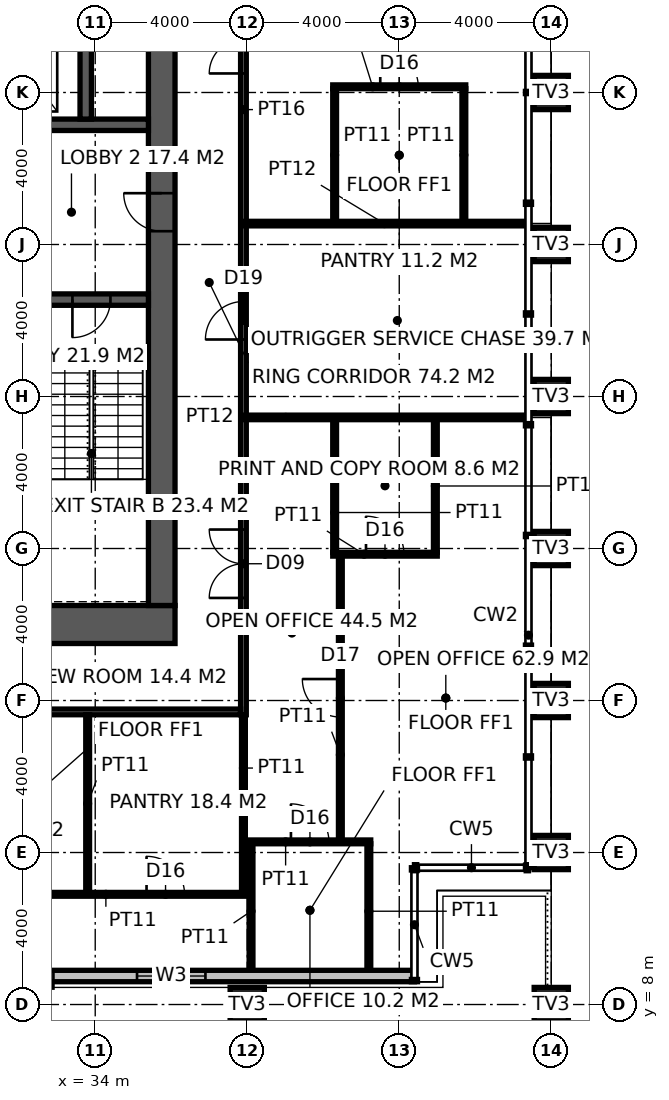
"""IFC4 building model, lengths in metres.
Left out: names, types, materials, properties, quantities, classifications, styles, units other than length and angle.
Written with IfcOpenShell. Run it as: python <this file> out.ifc"""

import sys

from ifc_helpers import new_model, si_unit, direction, frame, frame_2d, origin, origin_2d, place, context, subcontext, project, spatial, rectangle, hollow_rectangle, extrude, element, fill, save


model = new_model("IFC4")
c1 = context("Model", 3, precision=1e-05, world=origin(), true_north=direction((0.0, 1.0)))
c2 = subcontext(c1, "Body", "Model", "MODEL_VIEW")
j1 = project(units=[si_unit("LENGTHUNIT", "METRE"), si_unit("PLANEANGLEUNIT", "RADIAN")], contexts=[c1])
p1 = place(None, origin())
s1 = spatial("IfcSite", under=j1, at=p1, CompositionType="ELEMENT")
p2 = place(p1, origin())
s2 = spatial("IfcBuilding", under=s1, at=p2, CompositionType="ELEMENT")
p3 = place(p2, frame((0.0, 0.0, 171.8)))
s3 = spatial("IfcBuildingStorey", under=s2, at=p3, CompositionType="ELEMENT", Elevation=171.8)
for number, where, z_axis, x_axis in (
    (1, (38.0, 8.0, 0.0), (0.0, 0.0, 1.0), (1.0, 0.0, 0.0)),
    (2, (46.0, 8.0, 0.0), (0.0, 0.0, 1.0), (1.0, 0.0, 0.0)),
    (3, (46.0, 12.0, 0.0), (0.0, 0.0, 1.0), (1.0, 0.0, 0.0)),
    (4, (46.0, 16.0, 0.0), (0.0, 0.0, 1.0), (1.0, 0.0, 0.0)),
    (5, (46.0, 20.0, 0.0), (0.0, 0.0, 1.0), (1.0, 0.0, 0.0)),
    (6, (46.0, 24.0, 0.0), (0.0, 0.0, 1.0), (1.0, 0.0, 0.0)),
    (7, (46.0, 28.0, 0.0), (0.0, 0.0, 1.0), (1.0, 0.0, 0.0)),
    (8, (46.0, 32.0, 0.0), (0.0, 0.0, 1.0), (1.0, 0.0, 0.0)),
):
    element("IfcColumn", number, at=place(p3, frame(where, z_axis=z_axis, x_axis=x_axis)), inside=s3, PredefinedType="USERDEFINED", context=c2, shape_type="SweptSolid", body=[
        extrude(hollow_rectangle(XDim=0.9, YDim=0.9, WallThickness=0.08, at=origin_2d()), origin(), (0.0, 0.0, 1.0), 4.0),
    ])
p4 = place(p3, frame((18.5, 18.0, -0.15), z_axis=(0.0, 0.0, 1.0), x_axis=(1.0, 0.0, 0.0)))
e9 = element("IfcWall", 9, at=p4, inside=s3, PredefinedType="SHEAR", context=c2, shape_type="SweptSolid", body=[
    extrude(rectangle(XDim=17.6, YDim=1.0, at=frame_2d((8.8, 0.0))), origin(), (0.0, 0.0, 1.0), 4.0),
])
p5 = place(p4, frame((3.45, 0.0, 0.15)))
e10 = element("IfcOpeningElement", 10, at=p5, cuts=e9, PredefinedType="OPENING", context=c2, shape_type="SweptSolid", body=[
    extrude(rectangle(XDim=1.5, YDim=2.4, at=frame_2d((0.75, 1.2))), frame((0.0, 0.51, 0.0), z_axis=(0.0, -1.0, 0.0), x_axis=(1.0, 0.0, 0.0)), (0.0, 0.0, 1.0), 1.02),
])
p6 = place(p3, frame((35.75, 18.5, -0.15), z_axis=(0.0, 0.0, 1.0), x_axis=(0.0, 1.0, 0.0)))
e11 = element("IfcWall", 11, at=p6, inside=s3, PredefinedType="SHEAR", context=c2, shape_type="SweptSolid", body=[
    extrude(rectangle(XDim=17.0, YDim=0.7, at=frame_2d((8.5, 0.0))), origin(), (0.0, 0.0, 1.0), 4.0),
])
p7 = place(p6, frame((9.85, 0.0, 0.15)))
e12 = element("IfcOpeningElement", 12, at=p7, cuts=e11, PredefinedType="OPENING", context=c2, shape_type="SweptSolid", body=[
    extrude(rectangle(XDim=1.0, YDim=2.2, at=frame_2d((0.5, 1.1))), frame((0.0, 0.36, 0.0), z_axis=(0.0, -1.0, 0.0), x_axis=(1.0, 0.0, 0.0)), (0.0, 0.0, 1.0), 0.72),
])
p8 = place(p3, frame((24.15, 26.55, -0.15), z_axis=(0.0, 0.0, 1.0), x_axis=(1.0, 0.0, 0.0)))
e13 = element("IfcWall", 13, at=p8, inside=s3, PredefinedType="SHEAR", context=c2, shape_type="SweptSolid", body=[
    extrude(rectangle(XDim=11.25, YDim=0.3, at=frame_2d((5.625, 0.0))), origin(), (0.0, 0.0, 1.0), 4.0),
])
p9 = place(p8, frame((9.25, 0.0, 0.15)))
e14 = element("IfcOpeningElement", 14, at=p9, cuts=e13, PredefinedType="OPENING", context=c2, shape_type="SweptSolid", body=[
    extrude(rectangle(XDim=1.0, YDim=2.2, at=frame_2d((0.5, 1.1))), frame((0.0, 0.16, 0.0), z_axis=(0.0, -1.0, 0.0), x_axis=(1.0, 0.0, 0.0)), (0.0, 0.0, 1.0), 0.32),
])
p10 = place(p8, frame((4.9, 0.0, 0.15)))
e15 = element("IfcOpeningElement", 15, at=p10, cuts=e13, PredefinedType="OPENING", context=c2, shape_type="SweptSolid", body=[
    extrude(rectangle(XDim=1.5, YDim=2.4, at=frame_2d((0.75, 1.2))), frame((0.0, 0.16, 0.0), z_axis=(0.0, -1.0, 0.0), x_axis=(1.0, 0.0, 0.0)), (0.0, 0.0, 1.0), 0.32),
])
p11 = place(p3, frame((24.15, 31.15, -0.15), z_axis=(0.0, 0.0, 1.0), x_axis=(1.0, 0.0, 0.0)))
e16 = element("IfcWall", 16, at=p11, inside=s3, PredefinedType="SHEAR", context=c2, shape_type="SweptSolid", body=[
    extrude(rectangle(XDim=11.25, YDim=0.3, at=frame_2d((5.625, 0.0))), origin(), (0.0, 0.0, 1.0), 4.0),
])
p12 = place(p11, frame((7.25, 0.0, 0.15)))
e17 = element("IfcOpeningElement", 17, at=p12, cuts=e16, PredefinedType="OPENING", context=c2, shape_type="SweptSolid", body=[
    extrude(rectangle(XDim=1.4, YDim=2.4, at=frame_2d((0.7, 1.2))), frame((0.0, 0.16, 0.0), z_axis=(0.0, -1.0, 0.0), x_axis=(1.0, 0.0, 0.0)), (0.0, 0.0, 1.0), 0.32),
])
p13 = place(p3, frame((33.75, 31.3, -0.15), z_axis=(0.0, 0.0, 1.0), x_axis=(0.0, 1.0, 0.0)))
e18 = element("IfcWall", 18, at=p13, inside=s3, PredefinedType="SHEAR", context=c2, shape_type="SweptSolid", body=[
    extrude(rectangle(XDim=4.2, YDim=0.3, at=frame_2d((2.1, 0.0))), origin(), (0.0, 0.0, 1.0), 4.0),
])
p14 = place(p3, frame((37.9, 15.625, 0.0), z_axis=(0.0, 0.0, 1.0), x_axis=(0.0, 1.0, 0.0)))
e19 = element("IfcWall", 19, at=p14, inside=s3, PredefinedType="PARTITIONING", context=c2, shape_type="SweptSolid", body=[
    extrude(rectangle(XDim=22.75, YDim=0.15, at=frame_2d((11.375, 0.0))), origin(), (0.0, 0.0, 1.0), 2.65),
])
p15 = place(p14, frame((3.074, 0.0, 0.0)))
e20 = element("IfcOpeningElement", 20, at=p15, cuts=e19, PredefinedType="OPENING", context=c2, shape_type="SweptSolid", body=[
    extrude(rectangle(XDim=1.8, YDim=2.4, at=frame_2d((0.9, 1.2))), frame((0.0, 0.085, 0.0), z_axis=(0.0, -1.0, 0.0), x_axis=(1.0, 0.0, 0.0)), (0.0, 0.0, 1.0), 0.17),
])
p16 = place(p14, frame((16.876, 0.0, 0.0)))
e21 = element("IfcOpeningElement", 21, at=p16, cuts=e19, PredefinedType="OPENING", context=c2, shape_type="SweptSolid", body=[
    extrude(rectangle(XDim=1.8, YDim=2.4, at=frame_2d((0.9, 1.2))), frame((0.0, 0.085, 0.0), z_axis=(0.0, -1.0, 0.0), x_axis=(1.0, 0.0, 0.0)), (0.0, 0.0, 1.0), 0.17),
])
p17 = place(p14, frame((9.875, 0.0, 0.0)))
e22 = element("IfcOpeningElement", 22, at=p17, cuts=e19, PredefinedType="OPENING", context=c2, shape_type="SweptSolid", body=[
    extrude(rectangle(XDim=1.0, YDim=2.2, at=frame_2d((0.5, 1.1))), frame((0.0, 0.085, 0.0), z_axis=(0.0, -1.0, 0.0), x_axis=(1.0, 0.0, 0.0)), (0.0, 0.0, 1.0), 0.17),
])
p18 = place(p3, frame((15.775, 15.7, 0.0), z_axis=(0.0, 0.0, 1.0), x_axis=(1.0, 0.0, 0.0)))
e23 = element("IfcWall", 23, at=p18, inside=s3, PredefinedType="PARTITIONING", context=c2, shape_type="SweptSolid", body=[
    extrude(rectangle(XDim=22.05, YDim=0.15, at=frame_2d((11.025, 0.0))), origin(), (0.0, 0.0, 1.0), 3.85),
])
p19 = place(p18, frame((11.725, 0.0, 0.0)))
e24 = element("IfcOpeningElement", 24, at=p19, cuts=e23, PredefinedType="OPENING", context=c2, shape_type="SweptSolid", body=[
    extrude(rectangle(XDim=1.0, YDim=2.2, at=frame_2d((0.5, 1.1))), frame((0.0, 0.085, 0.0), z_axis=(0.0, -1.0, 0.0), x_axis=(1.0, 0.0, 0.0)), (0.0, 0.0, 1.0), 0.17),
])
for number, where, z_axis, x_axis in (
    (25, (37.9, 23.45, 0.0), (0.0, 0.0, 1.0), (1.0, 0.0, 0.0)),
    (26, (37.9, 28.55, 0.0), (0.0, 0.0, 1.0), (1.0, 0.0, 0.0)),
):
    element("IfcWall", number, at=place(p3, frame(where, z_axis=z_axis, x_axis=x_axis)), inside=s3, PredefinedType="PARTITIONING", context=c2, shape_type="SweptSolid", body=[
        extrude(rectangle(XDim=7.42, YDim=0.12, at=frame_2d((3.71, 0.0))), origin(), (0.0, 0.0, 1.0), 2.65),
    ])
p20 = place(p3, frame((30.611, 10.9, 0.0), z_axis=(0.0, 0.0, 1.0), x_axis=(1.0, 0.0, 0.0)))
e27 = element("IfcWall", 27, at=p20, inside=s3, PredefinedType="PARTITIONING", context=c2, shape_type="SweptSolid", body=[
    extrude(rectangle(XDim=7.339, YDim=0.1, at=frame_2d((3.669, 0.0))), origin(), (0.0, 0.0, 1.0), 3.85),
])
p21 = place(p20, frame((1.065, 0.0, 0.0)))
e28 = element("IfcOpeningElement", 28, at=p21, cuts=e27, PredefinedType="OPENING", context=c2, shape_type="SweptSolid", body=[
    extrude(rectangle(XDim=1.0, YDim=2.2, at=frame_2d((0.5, 1.1))), frame((0.0, 0.06, 0.0), z_axis=(0.0, -1.0, 0.0), x_axis=(1.0, 0.0, 0.0)), (0.0, 0.0, 1.0), 0.12),
])
p22 = place(p20, frame((4.74, 0.0, 0.0)))
e29 = element("IfcOpeningElement", 29, at=p22, cuts=e27, PredefinedType="OPENING", context=c2, shape_type="SweptSolid", body=[
    extrude(rectangle(XDim=1.0, YDim=2.2, at=frame_2d((0.5, 1.1))), frame((0.0, 0.06, 0.0), z_axis=(0.0, -1.0, 0.0), x_axis=(1.0, 0.0, 0.0)), (0.0, 0.0, 1.0), 0.12),
])
p23 = place(p3, frame((38.05, 12.28, 0.0), z_axis=(0.0, 0.0, 1.0), x_axis=(1.0, 0.0, 0.0)))
e30 = element("IfcWall", 30, at=p23, inside=s3, PredefinedType="PARTITIONING", context=c2, shape_type="SweptSolid", body=[
    extrude(rectangle(XDim=3.2, YDim=0.1, at=frame_2d((1.6, 0.0))), origin(), (0.0, 0.0, 1.0), 3.85),
])
p24 = place(p23, frame((1.1, 0.0, 0.0)))
e31 = element("IfcOpeningElement", 31, at=p24, cuts=e30, PredefinedType="OPENING", context=c2, shape_type="SweptSolid", body=[
    extrude(rectangle(XDim=1.0, YDim=2.2, at=frame_2d((0.5, 1.1))), frame((0.0, 0.06, 0.0), z_axis=(0.0, -1.0, 0.0), x_axis=(1.0, 0.0, 0.0)), (0.0, 0.0, 1.0), 0.12),
])
p25 = place(p3, frame((40.25, 19.85, 0.0), z_axis=(0.0, 0.0, 1.0), x_axis=(1.0, 0.0, 0.0)))
e32 = element("IfcWall", 32, at=p25, inside=s3, PredefinedType="PARTITIONING", context=c2, shape_type="SweptSolid", body=[
    extrude(rectangle(XDim=2.75, YDim=0.1, at=frame_2d((1.375, 0.0))), origin(), (0.0, 0.0, 1.0), 2.85),
])
p26 = place(p25, frame((0.875, 0.0, 0.0)))
e33 = element("IfcOpeningElement", 33, at=p26, cuts=e32, PredefinedType="OPENING", context=c2, shape_type="SweptSolid", body=[
    extrude(rectangle(XDim=1.0, YDim=2.2, at=frame_2d((0.5, 1.1))), frame((0.0, 0.06, 0.0), z_axis=(0.0, -1.0, 0.0), x_axis=(1.0, 0.0, 0.0)), (0.0, 0.0, 1.0), 0.12),
])
p27 = place(p3, frame((40.25, 32.15, 0.0), z_axis=(0.0, 0.0, 1.0), x_axis=(1.0, 0.0, 0.0)))
e34 = element("IfcWall", 34, at=p27, inside=s3, PredefinedType="PARTITIONING", context=c2, shape_type="SweptSolid", body=[
    extrude(rectangle(XDim=3.5, YDim=0.1, at=frame_2d((1.75, 0.0))), origin(), (0.0, 0.0, 1.0), 2.95),
])
p28 = place(p27, frame((1.25, 0.0, 0.0)))
e35 = element("IfcOpeningElement", 35, at=p28, cuts=e34, PredefinedType="OPENING", context=c2, shape_type="SweptSolid", body=[
    extrude(rectangle(XDim=1.0, YDim=2.2, at=frame_2d((0.5, 1.1))), frame((0.0, 0.06, 0.0), z_axis=(0.0, -1.0, 0.0), x_axis=(1.0, 0.0, 0.0)), (0.0, 0.0, 1.0), 0.12),
])
for number, where, z_axis, x_axis in (
    (36, (33.801, 10.95, 0.0), (0.0, 0.0, 1.0), (0.0, 1.0, 0.0)),
    (37, (37.9, 10.95, 0.0), (0.0, 0.0, 1.0), (0.0, 1.0, 0.0)),
):
    element("IfcWall", number, at=place(p3, frame(where, z_axis=z_axis, x_axis=x_axis)), inside=s3, PredefinedType="PARTITIONING", context=c2, shape_type="SweptSolid", body=[
        extrude(rectangle(XDim=4.675, YDim=0.1, at=frame_2d((2.337, 0.0))), origin(), (0.0, 0.0, 1.0), 2.65),
    ])
p29 = place(p3, frame((38.1, 8.68, 0.0), z_axis=(0.0, 0.0, 1.0), x_axis=(0.0, 1.0, 0.0)))
e38 = element("IfcWall", 38, at=p29, inside=s3, PredefinedType="PARTITIONING", context=c2, shape_type="SweptSolid", body=[
    extrude(rectangle(XDim=3.55, YDim=0.1, at=frame_2d((1.775, 0.0))), origin(), (0.0, 0.0, 1.0), 2.65),
])
for number, where, z_axis, x_axis in (
    (39, (40.3, 19.9, 0.0), (0.0, 0.0, 1.0), (0.0, 1.0, 0.0)),
    (40, (40.3, 28.61, 0.0), (0.0, 0.0, 1.0), (0.0, 1.0, 0.0)),
):
    element("IfcWall", number, at=place(p3, frame(where, z_axis=z_axis, x_axis=x_axis)), inside=s3, PredefinedType="PARTITIONING", context=c2, shape_type="SweptSolid", body=[
        extrude(rectangle(XDim=3.49, YDim=0.1, at=frame_2d((1.745, 0.0))), origin(), (0.0, 0.0, 1.0), 3.85),
    ])
p30 = place(p3, frame((41.2, 8.68, 0.0), z_axis=(0.0, 0.0, 1.0), x_axis=(0.0, 1.0, 0.0)))
e41 = element("IfcWall", 41, at=p30, inside=s3, PredefinedType="PARTITIONING", context=c2, shape_type="SweptSolid", body=[
    extrude(rectangle(XDim=3.55, YDim=0.1, at=frame_2d((1.775, 0.0))), origin(), (0.0, 0.0, 1.0), 3.85),
])
for number, where, z_axis, x_axis in (
    (42, (42.95, 19.9, 0.0), (0.0, 0.0, 1.0), (0.0, 1.0, 0.0)),
    (43, (43.7, 28.61, 0.0), (0.0, 0.0, 1.0), (0.0, 1.0, 0.0)),
):
    element("IfcWall", number, at=place(p3, frame(where, z_axis=z_axis, x_axis=x_axis)), inside=s3, PredefinedType="PARTITIONING", context=c2, shape_type="SweptSolid", body=[
        extrude(rectangle(XDim=3.49, YDim=0.1, at=frame_2d((1.745, 0.0))), origin(), (0.0, 0.0, 1.0), 3.85),
    ])
p31 = place(p3, frame((40.45, 12.33, 0.0), z_axis=(0.0, 0.0, 1.0), x_axis=(0.0, 1.0, 0.0)))
e44 = element("IfcWall", 44, at=p31, inside=s3, PredefinedType="PARTITIONING", context=c2, shape_type="SweptSolid", body=[
    extrude(rectangle(XDim=7.47, YDim=0.1, at=frame_2d((3.735, 0.0))), origin(), (0.0, 0.0, 1.0), 3.85),
])
p32 = place(p31, frame((3.235, 0.0, 0.0)))
e45 = element("IfcOpeningElement", 45, at=p32, cuts=e44, PredefinedType="OPENING", context=c2, shape_type="SweptSolid", body=[
    extrude(rectangle(XDim=1.0, YDim=2.2, at=frame_2d((0.5, 1.1))), frame((0.0, 0.06, 0.0), z_axis=(0.0, -1.0, 0.0), x_axis=(1.0, 0.0, 0.0)), (0.0, 0.0, 1.0), 0.12),
])
p33 = place(p3, frame((9.6, 8.75, 0.0), z_axis=(0.0, 0.0, 1.0), x_axis=(1.0, 0.0, 0.0)))
e46 = element("IfcWall", 46, at=p33, inside=s3, PredefinedType="ELEMENTEDWALL", context=c2, shape_type="SweptSolid", body=[
    extrude(rectangle(XDim=32.8, YDim=0.3, at=frame_2d((16.4, 0.0))), origin(), (0.0, 0.0, 1.0), 3.85),
])
p34 = place(p33, frame((5.5, 0.0, 0.8)))
e47 = element("IfcOpeningElement", 47, at=p34, cuts=e46, PredefinedType="OPENING", context=c2, shape_type="SweptSolid", body=[
    extrude(rectangle(XDim=1.8, YDim=2.4, at=frame_2d((0.9, 1.2))), frame((0.0, 0.16, 0.0), z_axis=(0.0, -1.0, 0.0), x_axis=(1.0, 0.0, 0.0)), (0.0, 0.0, 1.0), 0.32),
])
p35 = place(p33, frame((9.5, 0.0, 0.0)))
e48 = element("IfcOpeningElement", 48, at=p35, cuts=e46, PredefinedType="OPENING", context=c2, shape_type="SweptSolid", body=[
    extrude(rectangle(XDim=1.8, YDim=2.4, at=frame_2d((0.9, 1.2))), frame((0.0, 0.16, 0.0), z_axis=(0.0, -1.0, 0.0), x_axis=(1.0, 0.0, 0.0)), (0.0, 0.0, 1.0), 0.32),
])
p36 = place(p33, frame((13.5, 0.0, 0.8)))
e49 = element("IfcOpeningElement", 49, at=p36, cuts=e46, PredefinedType="OPENING", context=c2, shape_type="SweptSolid", body=[
    extrude(rectangle(XDim=1.8, YDim=2.4, at=frame_2d((0.9, 1.2))), frame((0.0, 0.16, 0.0), z_axis=(0.0, -1.0, 0.0), x_axis=(1.0, 0.0, 0.0)), (0.0, 0.0, 1.0), 0.32),
])
p37 = place(p33, frame((17.2, 0.0, 0.8)))
e50 = element("IfcOpeningElement", 50, at=p37, cuts=e46, PredefinedType="OPENING", context=c2, shape_type="SweptSolid", body=[
    extrude(rectangle(XDim=1.0, YDim=2.4, at=frame_2d((0.5, 1.2))), frame((0.0, 0.16, 0.0), z_axis=(0.0, -1.0, 0.0), x_axis=(1.0, 0.0, 0.0)), (0.0, 0.0, 1.0), 0.32),
])
p38 = place(p33, frame((18.6, 0.0, 0.8)))
e51 = element("IfcOpeningElement", 51, at=p38, cuts=e46, PredefinedType="OPENING", context=c2, shape_type="SweptSolid", body=[
    extrude(rectangle(XDim=1.0, YDim=2.4, at=frame_2d((0.5, 1.2))), frame((0.0, 0.16, 0.0), z_axis=(0.0, -1.0, 0.0), x_axis=(1.0, 0.0, 0.0)), (0.0, 0.0, 1.0), 0.32),
])
p39 = place(p33, frame((21.5, 0.0, 0.0)))
e52 = element("IfcOpeningElement", 52, at=p39, cuts=e46, PredefinedType="OPENING", context=c2, shape_type="SweptSolid", body=[
    extrude(rectangle(XDim=1.8, YDim=2.4, at=frame_2d((0.9, 1.2))), frame((0.0, 0.16, 0.0), z_axis=(0.0, -1.0, 0.0), x_axis=(1.0, 0.0, 0.0)), (0.0, 0.0, 1.0), 0.32),
])
p40 = place(p33, frame((25.5, 0.0, 0.8)))
e53 = element("IfcOpeningElement", 53, at=p40, cuts=e46, PredefinedType="OPENING", context=c2, shape_type="SweptSolid", body=[
    extrude(rectangle(XDim=1.8, YDim=2.4, at=frame_2d((0.9, 1.2))), frame((0.0, 0.16, 0.0), z_axis=(0.0, -1.0, 0.0), x_axis=(1.0, 0.0, 0.0)), (0.0, 0.0, 1.0), 0.32),
])
p41 = place(p9, frame((1.0, 0.0, 0.0), z_axis=(0.0, 0.0, 1.0), x_axis=(-1.0, 0.0, 0.0)))
e54 = element("IfcDoor", 54, at=p41, inside=s3, OperationType="SINGLE_SWING_RIGHT", PredefinedType="DOOR", context=c2, shape_type="SweptSolid", body=[
    extrude(rectangle(XDim=1.0, YDim=2.2, at=frame_2d((0.5, 1.1))), frame((0.0, 0.025, 0.0), z_axis=(0.0, -1.0, 0.0), x_axis=(1.0, 0.0, 0.0)), (0.0, 0.0, 1.0), 0.05),
])
fill(e14, e54)
p42 = place(p7, origin())
e55 = element("IfcDoor", 55, at=p42, inside=s3, OperationType="SINGLE_SWING_RIGHT", PredefinedType="DOOR", context=c2, shape_type="SweptSolid", body=[
    extrude(rectangle(XDim=1.0, YDim=2.2, at=frame_2d((0.5, 1.1))), frame((0.0, 0.025, 0.0), z_axis=(0.0, -1.0, 0.0), x_axis=(1.0, 0.0, 0.0)), (0.0, 0.0, 1.0), 0.05),
])
fill(e12, e55)
p43 = place(p15, origin())
e56 = element("IfcDoor", 56, at=p43, inside=s3, OperationType="DOUBLE_DOOR_DOUBLE_SWING", PredefinedType="DOOR", context=c2, shape_type="SweptSolid", body=[
    extrude(rectangle(XDim=1.8, YDim=2.4, at=frame_2d((0.9, 1.2))), frame((0.0, 0.025, 0.0), z_axis=(0.0, -1.0, 0.0), x_axis=(1.0, 0.0, 0.0)), (0.0, 0.0, 1.0), 0.05),
])
fill(e20, e56)
p44 = place(p16, origin())
e57 = element("IfcDoor", 57, at=p44, inside=s3, OperationType="DOUBLE_DOOR_DOUBLE_SWING", PredefinedType="DOOR", context=c2, shape_type="SweptSolid", body=[
    extrude(rectangle(XDim=1.8, YDim=2.4, at=frame_2d((0.9, 1.2))), frame((0.0, 0.025, 0.0), z_axis=(0.0, -1.0, 0.0), x_axis=(1.0, 0.0, 0.0)), (0.0, 0.0, 1.0), 0.05),
])
fill(e21, e57)
p45 = place(p17, origin())
e58 = element("IfcDoor", 58, at=p45, inside=s3, OperationType="SINGLE_SWING_LEFT", PredefinedType="DOOR", context=c2, shape_type="SweptSolid", body=[
    extrude(rectangle(XDim=1.0, YDim=2.2, at=frame_2d((0.5, 1.1))), frame((0.0, 0.025, 0.0), z_axis=(0.0, -1.0, 0.0), x_axis=(1.0, 0.0, 0.0)), (0.0, 0.0, 1.0), 0.05),
])
fill(e22, e58)
p46 = place(p22, origin())
e59 = element("IfcDoor", 59, at=p46, inside=s3, OperationType="SINGLE_SWING_LEFT", PredefinedType="DOOR", context=c2, shape_type="SweptSolid", body=[
    extrude(rectangle(XDim=1.0, YDim=2.2, at=frame_2d((0.5, 1.1))), frame((0.0, 0.025, 0.0), z_axis=(0.0, -1.0, 0.0), x_axis=(1.0, 0.0, 0.0)), (0.0, 0.0, 1.0), 0.05),
])
fill(e29, e59)
p47 = place(p26, origin())
e60 = element("IfcDoor", 60, at=p47, inside=s3, OperationType="SINGLE_SWING_LEFT", PredefinedType="DOOR", context=c2, shape_type="SweptSolid", body=[
    extrude(rectangle(XDim=1.0, YDim=2.2, at=frame_2d((0.5, 1.1))), frame((0.0, 0.025, 0.0), z_axis=(0.0, -1.0, 0.0), x_axis=(1.0, 0.0, 0.0)), (0.0, 0.0, 1.0), 0.05),
])
fill(e33, e60)
p48 = place(p24, origin())
e61 = element("IfcDoor", 61, at=p48, inside=s3, OperationType="SINGLE_SWING_LEFT", PredefinedType="DOOR", context=c2, shape_type="SweptSolid", body=[
    extrude(rectangle(XDim=1.0, YDim=2.2, at=frame_2d((0.5, 1.1))), frame((0.0, 0.025, 0.0), z_axis=(0.0, -1.0, 0.0), x_axis=(1.0, 0.0, 0.0)), (0.0, 0.0, 1.0), 0.05),
])
fill(e31, e61)
p49 = place(p28, origin())
e62 = element("IfcDoor", 62, at=p49, inside=s3, OperationType="SINGLE_SWING_LEFT", PredefinedType="DOOR", context=c2, shape_type="SweptSolid", body=[
    extrude(rectangle(XDim=1.0, YDim=2.2, at=frame_2d((0.5, 1.1))), frame((0.0, 0.025, 0.0), z_axis=(0.0, -1.0, 0.0), x_axis=(1.0, 0.0, 0.0)), (0.0, 0.0, 1.0), 0.05),
])
fill(e35, e62)
p50 = place(p32, origin())
e63 = element("IfcDoor", 63, at=p50, inside=s3, OperationType="SINGLE_SWING_RIGHT", PredefinedType="DOOR", context=c2, shape_type="SweptSolid", body=[
    extrude(rectangle(XDim=1.0, YDim=2.2, at=frame_2d((0.5, 1.1))), frame((0.0, 0.025, 0.0), z_axis=(0.0, -1.0, 0.0), x_axis=(1.0, 0.0, 0.0)), (0.0, 0.0, 1.0), 0.05),
])
fill(e45, e63)
p51 = place(p39, origin())
e64 = element("IfcDoor", 64, at=p51, inside=s3, OperationType="DOUBLE_DOOR_SLIDING", PredefinedType="DOOR", context=c2, shape_type="SweptSolid", body=[
    extrude(rectangle(XDim=1.8, YDim=2.4, at=frame_2d((0.9, 1.2))), frame((0.0, 0.025, 0.0), z_axis=(0.0, -1.0, 0.0), x_axis=(1.0, 0.0, 0.0)), (0.0, 0.0, 1.0), 0.05),
])
fill(e52, e64)
p52 = place(p40, origin())
e65 = element("IfcWindow", 65, at=p52, inside=s3, PartitioningType="SINGLE_PANEL", PredefinedType="WINDOW", context=c2, shape_type="SweptSolid", body=[
    extrude(rectangle(XDim=1.8, YDim=2.4, at=frame_2d((0.9, 1.2))), frame((0.0, 0.03, 0.0), z_axis=(0.0, -1.0, 0.0), x_axis=(1.0, 0.0, 0.0)), (0.0, 0.0, 1.0), 0.06),
])
fill(e53, e65)
save(model, sys.argv[1])
